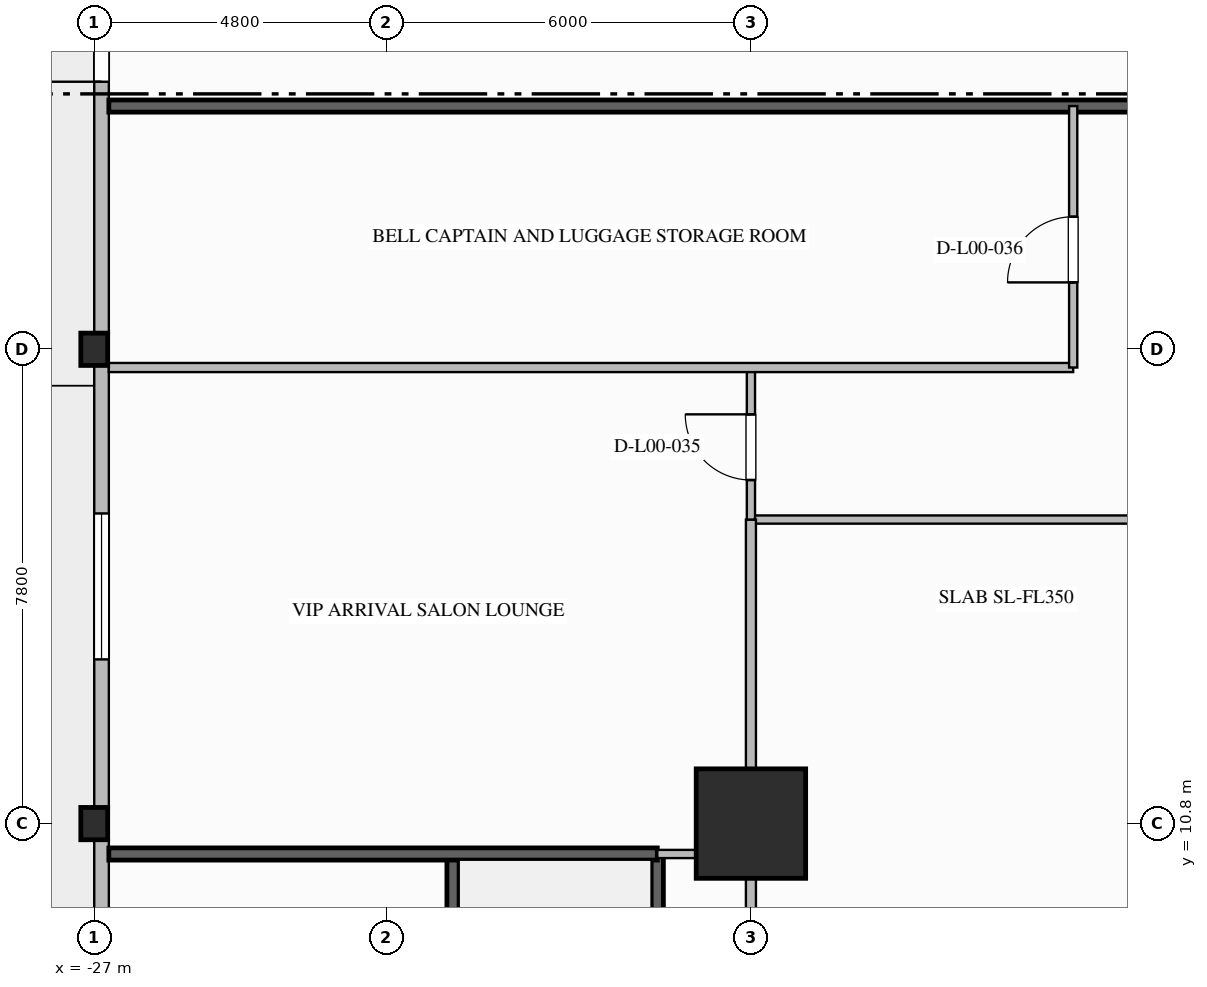
"""IFC4 building model, lengths in metres.
Left out: names, types, materials, properties, quantities, classifications, styles, units other than length and angle.
Written with IfcOpenShell. Run it as: python <this file> out.ifc"""

import sys

from ifc_helpers import new_model, si_unit, direction, frame, frame_2d, origin, origin_2d, place, context, subcontext, project, spatial, rectangle, i_section, extrude, element, fill, save


model = new_model("IFC4")
c1 = context("Model", 3, precision=1e-05, world=origin(), true_north=direction((0.0, 1.0)))
c2 = subcontext(c1, "Body", "Model", "MODEL_VIEW")
j1 = project(units=[si_unit("LENGTHUNIT", "METRE"), si_unit("PLANEANGLEUNIT", "RADIAN")], contexts=[c1])
p1 = place(None, origin())
s1 = spatial("IfcSite", under=j1, at=p1, CompositionType="ELEMENT")
p2 = place(p1, origin())
s2 = spatial("IfcBuilding", under=s1, at=p2, CompositionType="ELEMENT")
p3 = place(p2, origin())
s3 = spatial("IfcBuildingStorey", under=s2, at=p3, CompositionType="ELEMENT", Elevation=0.0)
p4 = place(p3, frame((-16.2, 10.8, 0.0), z_axis=(0.0, 0.0, 1.0), x_axis=(1.0, 0.0, 0.0)))
e1 = element("IfcColumn", 1, at=p4, inside=s3, PredefinedType="COLUMN", context=c2, shape_type="SweptSolid", body=[
    extrude(rectangle(XDim=1.8, YDim=1.8, at=origin_2d()), origin(), (0.0, 0.0, 1.0), 5.6),
])
for number, where, z_axis, x_axis in (
    (2, (-27.0, 10.8, 0.0), (0.0, 0.0, 1.0), (1.0, 0.0, 0.0)),
    (3, (-27.0, 18.6, 0.0), (0.0, 0.0, 1.0), (1.0, 0.0, 0.0)),
):
    element("IfcColumn", number, at=place(p3, frame(where, z_axis=z_axis, x_axis=x_axis)), inside=s3, PredefinedType="COLUMN", context=c2, shape_type="SweptSolid", body=[
        extrude(i_section(OverallWidth=0.442, OverallDepth=0.531, WebThickness=0.066, FlangeThickness=0.106, FilletRadius=0.03, at=origin_2d()), origin(), (0.0, 0.0, 1.0), 5.6),
    ])
p5 = place(p3, frame((-26.88, 5.058, 0.0), z_axis=(0.0, 0.0, 1.0), x_axis=(0.0, 1.0, 0.0)))
e4 = element("IfcWall", 4, at=p5, inside=s3, PredefinedType="STANDARD", context=c2, shape_type="SweptSolid", body=[
    extrude(rectangle(XDim=5.485, YDim=0.24, at=frame_2d((2.742, 0.0))), origin(), (0.0, 0.0, 1.0), 4.604),
])
p6 = place(p5, frame((1.742, 0.0, 0.0)))
e5 = element("IfcOpeningElement", 5, at=p6, cuts=e4, PredefinedType="OPENING", context=c2, shape_type="SweptSolid", body=[
    extrude(rectangle(XDim=2.0, YDim=2.4, at=frame_2d((1.0, 1.2))), frame((0.0, 0.13, 0.0), z_axis=(0.0, -1.0, 0.0), x_axis=(1.0, 0.0, 0.0)), (0.0, 0.0, 1.0), 0.26),
])
p7 = place(p3, frame((-26.88, 11.058, 0.0), z_axis=(0.0, 0.0, 1.0), x_axis=(0.0, 1.0, 0.0)))
e6 = element("IfcWall", 6, at=p7, inside=s3, PredefinedType="STANDARD", context=c2, shape_type="SweptSolid", body=[
    extrude(rectangle(XDim=7.285, YDim=0.24, at=frame_2d((3.642, 0.0))), origin(), (0.0, 0.0, 1.0), 4.604),
])
p8 = place(p7, frame((2.442, 0.0, 0.9)))
e7 = element("IfcOpeningElement", 7, at=p8, cuts=e6, PredefinedType="OPENING", context=c2, shape_type="SweptSolid", body=[
    extrude(rectangle(XDim=2.4, YDim=2.6, at=frame_2d((1.2, 1.3))), frame((0.0, 0.13, 0.0), z_axis=(0.0, -1.0, 0.0), x_axis=(1.0, 0.0, 0.0)), (0.0, 0.0, 1.0), 0.26),
])
p9 = place(p3, frame((-26.88, 18.858, 0.0), z_axis=(0.0, 0.0, 1.0), x_axis=(0.0, 1.0, 0.0)))
e8 = element("IfcWall", 8, at=p9, inside=s3, PredefinedType="STANDARD", context=c2, shape_type="SweptSolid", body=[
    extrude(rectangle(XDim=7.885, YDim=0.24, at=frame_2d((3.942, 0.0))), origin(), (0.0, 0.0, 1.0), 4.604),
])
p10 = place(p9, frame((4.142, 0.0, 0.0)))
e9 = element("IfcOpeningElement", 9, at=p10, cuts=e8, PredefinedType="OPENING", context=c2, shape_type="SweptSolid", body=[
    extrude(rectangle(XDim=2.0, YDim=2.4, at=frame_2d((1.0, 1.2))), frame((0.0, 0.13, 0.0), z_axis=(0.0, -1.0, 0.0), x_axis=(1.0, 0.0, 0.0)), (0.0, 0.0, 1.0), 0.26),
])
p11 = place(p3, frame((-21.1, 0.5, 0.0), z_axis=(0.0, 0.0, 1.0), x_axis=(0.0, 1.0, 0.0)))
e10 = element("IfcWall", 10, at=p11, inside=s3, PredefinedType="SOLIDWALL", context=c2, shape_type="SweptSolid", body=[
    extrude(rectangle(XDim=9.8, YDim=0.2, at=frame_2d((4.9, 0.0))), origin(), (0.0, 0.0, 1.0), 5.3),
])
p12 = place(p11, frame((0.35, 0.0, 0.0)))
e11 = element("IfcOpeningElement", 11, at=p12, cuts=e10, PredefinedType="OPENING", context=c2, shape_type="SweptSolid", body=[
    extrude(rectangle(XDim=1.15, YDim=2.15, at=frame_2d((0.575, 1.075))), frame((0.0, 0.11, 0.0), z_axis=(0.0, -1.0, 0.0), x_axis=(1.0, 0.0, 0.0)), (0.0, 0.0, 1.0), 0.22),
])
p13 = place(p3, frame((-17.74, 10.3, 0.0), z_axis=(0.0, 0.0, 1.0), x_axis=(0.0, -1.0, 0.0)))
e12 = element("IfcWall", 12, at=p13, inside=s3, PredefinedType="SOLIDWALL", context=c2, shape_type="SweptSolid", body=[
    extrude(rectangle(XDim=9.8, YDim=0.2, at=frame_2d((4.9, 0.0))), origin(), (0.0, 0.0, 1.0), 5.3),
])
p14 = place(p3, frame((-26.76, 22.6, 0.0), z_axis=(0.0, 0.0, 1.0), x_axis=(1.0, 0.0, 0.0)))
e13 = element("IfcWall", 13, at=p14, inside=s3, PredefinedType="SOLIDWALL", context=c2, shape_type="SweptSolid", body=[
    extrude(rectangle(XDim=18.06, YDim=0.2, at=frame_2d((9.03, 0.0))), origin(), (0.0, 0.0, 1.0), 5.3),
])
p15 = place(p3, frame((-26.76, 10.3, 0.0), z_axis=(0.0, 0.0, 1.0), x_axis=(1.0, 0.0, 0.0)))
e14 = element("IfcWall", 14, at=p15, inside=s3, PredefinedType="SOLIDWALL", context=c2, shape_type="SweptSolid", body=[
    extrude(rectangle(XDim=9.02, YDim=0.2, at=frame_2d((4.51, 0.0))), origin(), (0.0, 0.0, 1.0), 5.3),
])
p16 = place(p3, frame((-16.2, 15.8, 0.0), z_axis=(0.0, 0.0, 1.0), x_axis=(1.0, 0.0, 0.0)))
e15 = element("IfcWall", 15, at=p16, inside=s3, PredefinedType="PARTITIONING", context=c2, shape_type="SweptSolid", body=[
    extrude(rectangle(XDim=32.4, YDim=0.135, at=frame_2d((16.2, 0.0))), origin(), (0.0, 0.0, 1.0), 5.3),
])
p17 = place(p16, frame((6.5, 0.0, 0.0)))
e16 = element("IfcOpeningElement", 16, at=p17, cuts=e15, PredefinedType="OPENING", context=c2, shape_type="SweptSolid", body=[
    extrude(rectangle(XDim=1.8, YDim=2.35, at=frame_2d((0.9, 1.175))), frame((0.0, 0.077, 0.0), z_axis=(0.0, -1.0, 0.0), x_axis=(1.0, 0.0, 0.0)), (0.0, 0.0, 1.0), 0.155),
])
p18 = place(p16, frame((22.0, 0.0, 0.0)))
e17 = element("IfcOpeningElement", 17, at=p18, cuts=e15, PredefinedType="OPENING", context=c2, shape_type="SweptSolid", body=[
    extrude(rectangle(XDim=1.8, YDim=2.35, at=frame_2d((0.9, 1.175))), frame((0.0, 0.077, 0.0), z_axis=(0.0, -1.0, 0.0), x_axis=(1.0, 0.0, 0.0)), (0.0, 0.0, 1.0), 0.155),
])
p19 = place(p3, frame((-16.2, 0.3, 0.0), z_axis=(0.0, 0.0, 1.0), x_axis=(0.0, 1.0, 0.0)))
e18 = element("IfcWall", 18, at=p19, inside=s3, PredefinedType="PARTITIONING", context=c2, shape_type="SweptSolid", body=[
    extrude(rectangle(XDim=15.5, YDim=0.165, at=frame_2d((7.75, 0.0))), origin(), (0.0, 0.0, 1.0), 4.337),
])
p20 = place(p3, frame((-17.74, 10.3, 0.0), z_axis=(0.0, 0.0, 1.0), x_axis=(1.0, 0.0, 0.0)))
e19 = element("IfcWall", 19, at=p20, inside=s3, PredefinedType="PARTITIONING", context=c2, shape_type="SweptSolid", body=[
    extrude(rectangle(XDim=1.54, YDim=0.135, at=frame_2d((0.77, 0.0))), origin(), (0.0, 0.0, 1.0), 5.3),
])
p21 = place(p3, frame((-16.2, 15.8, 0.0), z_axis=(0.0, 0.0, 1.0), x_axis=(0.0, 1.0, 0.0)))
e20 = element("IfcWall", 20, at=p21, inside=s3, PredefinedType="PARTITIONING", context=c2, shape_type="SweptSolid", body=[
    extrude(rectangle(XDim=2.5, YDim=0.135, at=frame_2d((1.25, 0.0))), origin(), (0.0, 0.0, 1.0), 4.337),
])
p22 = place(p21, frame((0.65, 0.0, 0.0)))
e21 = element("IfcOpeningElement", 21, at=p22, cuts=e20, PredefinedType="OPENING", context=c2, shape_type="SweptSolid", body=[
    extrude(rectangle(XDim=1.08, YDim=2.04, at=frame_2d((0.54, 1.02))), frame((0.0, 0.077, 0.0), z_axis=(0.0, -1.0, 0.0), x_axis=(1.0, 0.0, 0.0)), (0.0, 0.0, 1.0), 0.155),
])
p23 = place(p3, frame((-26.76, 18.3, 0.0), z_axis=(0.0, 0.0, 1.0), x_axis=(1.0, 0.0, 0.0)))
e22 = element("IfcWall", 22, at=p23, inside=s3, PredefinedType="PARTITIONING", context=c2, shape_type="SweptSolid", body=[
    extrude(rectangle(XDim=15.86, YDim=0.15, at=frame_2d((7.93, 0.0))), origin(), (0.0, 0.0, 1.0), 4.512),
])
p24 = place(p3, frame((-10.9, 18.3, 0.0), z_axis=(0.0, 0.0, 1.0), x_axis=(0.0, 1.0, 0.0)))
e23 = element("IfcWall", 23, at=p24, inside=s3, PredefinedType="PARTITIONING", context=c2, shape_type="SweptSolid", body=[
    extrude(rectangle(XDim=4.3, YDim=0.135, at=frame_2d((2.15, 0.0))), origin(), (0.0, 0.0, 1.0), 5.3),
])
p25 = place(p24, frame((1.4, 0.0, 0.0)))
e24 = element("IfcOpeningElement", 24, at=p25, cuts=e23, PredefinedType="OPENING", context=c2, shape_type="SweptSolid", body=[
    extrude(rectangle(XDim=1.08, YDim=2.04, at=frame_2d((0.54, 1.02))), frame((0.0, 0.077, 0.0), z_axis=(0.0, -1.0, 0.0), x_axis=(1.0, 0.0, 0.0)), (0.0, 0.0, 1.0), 0.155),
])
p26 = place(p8, origin())
e25 = element("IfcWindow", 25, at=p26, inside=s3, PartitioningType="SINGLE_PANEL", PredefinedType="WINDOW", context=c2, shape_type="SweptSolid", body=[
    extrude(rectangle(XDim=2.4, YDim=2.6, at=frame_2d((1.2, 1.3))), frame((0.0, 0.03, 0.0), z_axis=(0.0, -1.0, 0.0), x_axis=(1.0, 0.0, 0.0)), (0.0, 0.0, 1.0), 0.06),
])
fill(e7, e25)
p27 = place(p10, origin())
e26 = element("IfcDoor", 26, at=p27, inside=s3, OperationType="DOUBLE_DOOR_SINGLE_SWING", PredefinedType="DOOR", context=c2, shape_type="SweptSolid", body=[
    extrude(rectangle(XDim=2.0, YDim=2.4, at=frame_2d((1.0, 1.2))), frame((0.0, 0.025, 0.0), z_axis=(0.0, -1.0, 0.0), x_axis=(1.0, 0.0, 0.0)), (0.0, 0.0, 1.0), 0.05),
])
fill(e9, e26)
p28 = place(p22, origin())
e27 = element("IfcDoor", 27, at=p28, inside=s3, OperationType="SINGLE_SWING_RIGHT", PredefinedType="DOOR", context=c2, shape_type="SweptSolid", body=[
    extrude(rectangle(XDim=1.08, YDim=2.04, at=frame_2d((0.54, 1.02))), frame((0.0, 0.025, 0.0), z_axis=(0.0, -1.0, 0.0), x_axis=(1.0, 0.0, 0.0)), (0.0, 0.0, 1.0), 0.05),
])
fill(e21, e27)
p29 = place(p25, origin())
e28 = element("IfcDoor", 28, at=p29, inside=s3, OperationType="SINGLE_SWING_LEFT", PredefinedType="DOOR", context=c2, shape_type="SweptSolid", body=[
    extrude(rectangle(XDim=1.08, YDim=2.04, at=frame_2d((0.54, 1.02))), frame((0.0, 0.025, 0.0), z_axis=(0.0, -1.0, 0.0), x_axis=(1.0, 0.0, 0.0)), (0.0, 0.0, 1.0), 0.05),
])
fill(e24, e28)
save(model, sys.argv[1])
